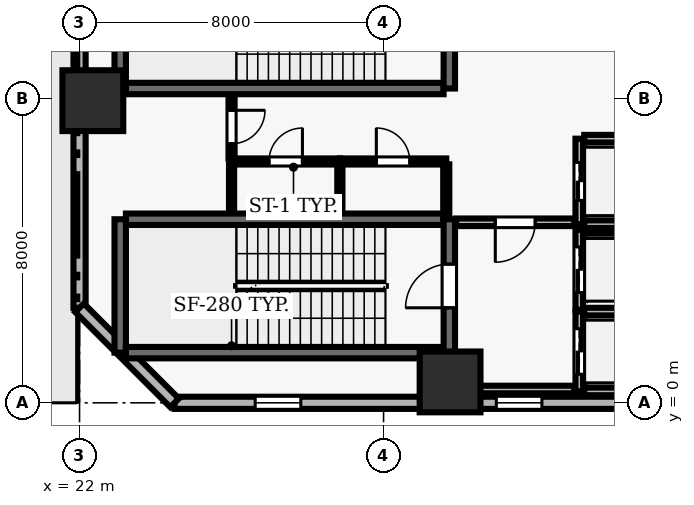
"""IFC4 building model, lengths in metres.
Left out: names, types, materials, properties, quantities, classifications, styles, units other than length and angle.
Written with IfcOpenShell. Run it as: python <this file> out.ifc"""

import sys

from ifc_helpers import new_model, si_unit, direction, frame, frame_2d, origin, origin_2d, place, context, subcontext, project, spatial, rectangle, extrude, element, fill, save


model = new_model("IFC4")
c1 = context("Model", 3, precision=1e-05, world=origin(), true_north=direction((0.0, 1.0)))
c2 = subcontext(c1, "Body", "Model", "MODEL_VIEW")
j1 = project(units=[si_unit("LENGTHUNIT", "METRE"), si_unit("PLANEANGLEUNIT", "RADIAN")], contexts=[c1])
p1 = place(None, origin())
s1 = spatial("IfcSite", under=j1, at=p1, CompositionType="ELEMENT")
p2 = place(p1, origin())
s2 = spatial("IfcBuilding", under=s1, at=p2, CompositionType="ELEMENT")
p3 = place(p2, origin())
s3 = spatial("IfcBuildingStorey", under=s2, at=p3, CompositionType="ELEMENT", Elevation=0.0)
for number, where, z_axis, x_axis in (
    (1, (31.75, 0.55, 0.0), (0.0, 0.0, 1.0), (1.0, 0.0, 0.0)),
    (2, (22.35, 7.95, 0.0), (0.0, 0.0, 1.0), (1.0, 0.0, 0.0)),
):
    element("IfcColumn", number, at=place(p3, frame(where, z_axis=z_axis, x_axis=x_axis)), inside=s3, PredefinedType="COLUMN", context=c2, shape_type="SweptSolid", body=[
        extrude(rectangle(XDim=1.6, YDim=1.6, at=origin_2d()), origin(), (0.0, 0.0, 1.0), 5.2),
    ])
p4 = place(p3, frame((24.5, 0.0, 0.0), z_axis=(0.0, 0.0, 1.0), x_axis=(1.0, 0.0, 0.0)))
e3 = element("IfcWall", 3, at=p4, inside=s3, PredefinedType="SOLIDWALL", context=c2, shape_type="SweptSolid", body=[
    extrude(rectangle(XDim=49.0, YDim=0.32, at=frame_2d((24.5, 0.0))), origin(), (0.0, 0.0, 1.0), 4.92),
])
p5 = place(p4, frame((2.122, 0.0, 0.9)))
e4 = element("IfcOpeningElement", 4, at=p5, cuts=e3, PredefinedType="OPENING", context=c2, shape_type="SweptSolid", body=[
    extrude(rectangle(XDim=1.2, YDim=1.6, at=frame_2d((0.6, 0.8))), frame((0.0, 0.17, 0.0), z_axis=(0.0, -1.0, 0.0), x_axis=(1.0, 0.0, 0.0)), (0.0, 0.0, 1.0), 0.34),
])
p6 = place(p4, frame((8.467, 0.0, 0.9)))
e5 = element("IfcOpeningElement", 5, at=p6, cuts=e3, PredefinedType="OPENING", context=c2, shape_type="SweptSolid", body=[
    extrude(rectangle(XDim=1.2, YDim=1.6, at=frame_2d((0.6, 0.8))), frame((0.0, 0.17, 0.0), z_axis=(0.0, -1.0, 0.0), x_axis=(1.0, 0.0, 0.0)), (0.0, 0.0, 1.0), 0.34),
])
p7 = place(p4, frame((18.456, 0.0, 0.9)))
e6 = element("IfcOpeningElement", 6, at=p7, cuts=e3, PredefinedType="OPENING", context=c2, shape_type="SweptSolid", body=[
    extrude(rectangle(XDim=1.2, YDim=1.6, at=frame_2d((0.6, 0.8))), frame((0.0, 0.17, 0.0), z_axis=(0.0, -1.0, 0.0), x_axis=(1.0, 0.0, 0.0)), (0.0, 0.0, 1.0), 0.34),
])
p8 = place(p4, frame((23.9, 0.0, 0.9)))
e7 = element("IfcOpeningElement", 7, at=p8, cuts=e3, PredefinedType="OPENING", context=c2, shape_type="SweptSolid", body=[
    extrude(rectangle(XDim=1.2, YDim=1.6, at=frame_2d((0.6, 0.8))), frame((0.0, 0.17, 0.0), z_axis=(0.0, -1.0, 0.0), x_axis=(1.0, 0.0, 0.0)), (0.0, 0.0, 1.0), 0.34),
])
p9 = place(p4, frame((29.344, 0.0, 0.9)))
e8 = element("IfcOpeningElement", 8, at=p9, cuts=e3, PredefinedType="OPENING", context=c2, shape_type="SweptSolid", body=[
    extrude(rectangle(XDim=1.2, YDim=1.6, at=frame_2d((0.6, 0.8))), frame((0.0, 0.17, 0.0), z_axis=(0.0, -1.0, 0.0), x_axis=(1.0, 0.0, 0.0)), (0.0, 0.0, 1.0), 0.34),
])
p10 = place(p4, frame((34.789, 0.0, 0.9)))
e9 = element("IfcOpeningElement", 9, at=p10, cuts=e3, PredefinedType="OPENING", context=c2, shape_type="SweptSolid", body=[
    extrude(rectangle(XDim=1.2, YDim=1.6, at=frame_2d((0.6, 0.8))), frame((0.0, 0.17, 0.0), z_axis=(0.0, -1.0, 0.0), x_axis=(1.0, 0.0, 0.0)), (0.0, 0.0, 1.0), 0.34),
])
p11 = place(p4, frame((40.233, 0.0, 0.9)))
e10 = element("IfcOpeningElement", 10, at=p11, cuts=e3, PredefinedType="OPENING", context=c2, shape_type="SweptSolid", body=[
    extrude(rectangle(XDim=1.2, YDim=1.6, at=frame_2d((0.6, 0.8))), frame((0.0, 0.17, 0.0), z_axis=(0.0, -1.0, 0.0), x_axis=(1.0, 0.0, 0.0)), (0.0, 0.0, 1.0), 0.34),
])
p12 = place(p4, frame((45.678, 0.0, 0.9)))
e11 = element("IfcOpeningElement", 11, at=p12, cuts=e3, PredefinedType="OPENING", context=c2, shape_type="SweptSolid", body=[
    extrude(rectangle(XDim=1.2, YDim=1.6, at=frame_2d((0.6, 0.8))), frame((0.0, 0.17, 0.0), z_axis=(0.0, -1.0, 0.0), x_axis=(1.0, 0.0, 0.0)), (0.0, 0.0, 1.0), 0.34),
])
p13 = place(p3, frame((22.0, 51.5, 0.0), z_axis=(0.0, 0.0, 1.0), x_axis=(0.0, -1.0, 0.0)))
e12 = element("IfcWall", 12, at=p13, inside=s3, PredefinedType="SOLIDWALL", context=c2, shape_type="SweptSolid", body=[
    extrude(rectangle(XDim=49.0, YDim=0.32, at=frame_2d((24.5, 0.0))), origin(), (0.0, 0.0, 1.0), 4.92),
])
p14 = place(p13, frame((11.4, 0.0, 0.0)))
e13 = element("IfcOpeningElement", 13, at=p14, cuts=e12, PredefinedType="OPENING", context=c2, shape_type="SweptSolid", body=[
    extrude(rectangle(XDim=1.8, YDim=2.4, at=frame_2d((0.9, 1.2))), frame((0.0, 0.17, 0.0), z_axis=(0.0, -1.0, 0.0), x_axis=(1.0, 0.0, 0.0)), (0.0, 0.0, 1.0), 0.34),
])
p15 = place(p13, frame((18.4, 0.0, 0.0)))
e14 = element("IfcOpeningElement", 14, at=p15, cuts=e12, PredefinedType="OPENING", context=c2, shape_type="SweptSolid", body=[
    extrude(rectangle(XDim=1.8, YDim=2.4, at=frame_2d((0.9, 1.2))), frame((0.0, 0.17, 0.0), z_axis=(0.0, -1.0, 0.0), x_axis=(1.0, 0.0, 0.0)), (0.0, 0.0, 1.0), 0.34),
])
p16 = place(p13, frame((1.822, 0.0, 0.9)))
e15 = element("IfcOpeningElement", 15, at=p16, cuts=e12, PredefinedType="OPENING", context=c2, shape_type="SweptSolid", body=[
    extrude(rectangle(XDim=1.8, YDim=2.2, at=frame_2d((0.9, 1.1))), frame((0.0, 0.17, 0.0), z_axis=(0.0, -1.0, 0.0), x_axis=(1.0, 0.0, 0.0)), (0.0, 0.0, 1.0), 0.34),
])
p17 = place(p13, frame((7.267, 0.0, 0.9)))
e16 = element("IfcOpeningElement", 16, at=p17, cuts=e12, PredefinedType="OPENING", context=c2, shape_type="SweptSolid", body=[
    extrude(rectangle(XDim=1.8, YDim=2.2, at=frame_2d((0.9, 1.1))), frame((0.0, 0.17, 0.0), z_axis=(0.0, -1.0, 0.0), x_axis=(1.0, 0.0, 0.0)), (0.0, 0.0, 1.0), 0.34),
])
p18 = place(p13, frame((23.15, 0.0, 0.9)))
e17 = element("IfcOpeningElement", 17, at=p18, cuts=e12, PredefinedType="OPENING", context=c2, shape_type="SweptSolid", body=[
    extrude(rectangle(XDim=1.8, YDim=2.2, at=frame_2d((0.9, 1.1))), frame((0.0, 0.17, 0.0), z_axis=(0.0, -1.0, 0.0), x_axis=(1.0, 0.0, 0.0)), (0.0, 0.0, 1.0), 0.34),
])
p19 = place(p13, frame((29.494, 0.0, 0.9)))
e18 = element("IfcOpeningElement", 18, at=p19, cuts=e12, PredefinedType="OPENING", context=c2, shape_type="SweptSolid", body=[
    extrude(rectangle(XDim=1.8, YDim=2.2, at=frame_2d((0.9, 1.1))), frame((0.0, 0.17, 0.0), z_axis=(0.0, -1.0, 0.0), x_axis=(1.0, 0.0, 0.0)), (0.0, 0.0, 1.0), 0.34),
])
p20 = place(p13, frame((34.039, 0.0, 0.9)))
e19 = element("IfcOpeningElement", 19, at=p20, cuts=e12, PredefinedType="OPENING", context=c2, shape_type="SweptSolid", body=[
    extrude(rectangle(XDim=1.8, YDim=2.2, at=frame_2d((0.9, 1.1))), frame((0.0, 0.17, 0.0), z_axis=(0.0, -1.0, 0.0), x_axis=(1.0, 0.0, 0.0)), (0.0, 0.0, 1.0), 0.34),
])
p21 = place(p13, frame((39.933, 0.0, 0.9)))
e20 = element("IfcOpeningElement", 20, at=p21, cuts=e12, PredefinedType="OPENING", context=c2, shape_type="SweptSolid", body=[
    extrude(rectangle(XDim=1.8, YDim=2.2, at=frame_2d((0.9, 1.1))), frame((0.0, 0.17, 0.0), z_axis=(0.0, -1.0, 0.0), x_axis=(1.0, 0.0, 0.0)), (0.0, 0.0, 1.0), 0.34),
])
p22 = place(p3, frame((22.0, 2.5, 0.0), z_axis=(0.0, 0.0, 1.0), x_axis=(0.707106781187, -0.707106781187, 0.0)))
e21 = element("IfcWall", 21, at=p22, inside=s3, PredefinedType="SOLIDWALL", context=c2, shape_type="SweptSolid", body=[
    extrude(rectangle(XDim=3.536, YDim=0.32, at=frame_2d((1.768, 0.0))), origin(), (0.0, 0.0, 1.0), 4.92),
])
p23 = place(p3, frame((31.58, 4.83, 0.0), z_axis=(0.0, 0.0, 1.0), x_axis=(-1.0, 0.0, 0.0)))
e22 = element("IfcWall", 22, at=p23, inside=s3, PredefinedType="SHEAR", context=c2, shape_type="SweptSolid", body=[
    extrude(rectangle(XDim=8.36, YDim=0.3, at=frame_2d((4.18, 0.0))), origin(), (0.0, 0.0, 1.0), 4.92),
])
p24 = place(p3, frame((23.07, 4.83, 0.0), z_axis=(0.0, 0.0, 1.0), x_axis=(0.0, -1.0, 0.0)))
e23 = element("IfcWall", 23, at=p24, inside=s3, PredefinedType="SHEAR", context=c2, shape_type="SweptSolid", body=[
    extrude(rectangle(XDim=3.51, YDim=0.3, at=frame_2d((1.755, 0.0))), origin(), (0.0, 0.0, 1.0), 4.92),
])
p25 = place(p3, frame((23.22, 1.32, 0.0), z_axis=(0.0, 0.0, 1.0), x_axis=(1.0, 0.0, 0.0)))
e24 = element("IfcWall", 24, at=p25, inside=s3, PredefinedType="SHEAR", context=c2, shape_type="SweptSolid", body=[
    extrude(rectangle(XDim=8.36, YDim=0.3, at=frame_2d((4.18, 0.0))), origin(), (0.0, 0.0, 1.0), 4.92),
])
p26 = place(p3, frame((31.73, 0.96, 0.0), z_axis=(0.0, 0.0, 1.0), x_axis=(0.0, 1.0, 0.0)))
e25 = element("IfcWall", 25, at=p26, inside=s3, PredefinedType="SHEAR", context=c2, shape_type="SweptSolid", body=[
    extrude(rectangle(XDim=3.87, YDim=0.3, at=frame_2d((1.935, 0.0))), origin(), (0.0, 0.0, 1.0), 4.92),
])
p27 = place(p26, frame((1.54, 0.0, 0.0)))
e26 = element("IfcOpeningElement", 26, at=p27, cuts=e25, PredefinedType="OPENING", context=c2, shape_type="SweptSolid", body=[
    extrude(rectangle(XDim=1.15, YDim=2.15, at=frame_2d((0.575, 1.075))), frame((0.0, 0.16, 0.0), z_axis=(0.0, -1.0, 0.0), x_axis=(1.0, 0.0, 0.0)), (0.0, 0.0, 1.0), 0.32),
])
p28 = place(p3, frame((23.07, 11.78, 0.0), z_axis=(0.0, 0.0, 1.0), x_axis=(0.0, -1.0, 0.0)))
e27 = element("IfcWall", 27, at=p28, inside=s3, PredefinedType="SHEAR", context=c2, shape_type="SweptSolid", body=[
    extrude(rectangle(XDim=3.51, YDim=0.3, at=frame_2d((1.755, 0.0))), origin(), (0.0, 0.0, 1.0), 4.92),
])
p29 = place(p3, frame((23.22, 8.27, 0.0), z_axis=(0.0, 0.0, 1.0), x_axis=(1.0, 0.0, 0.0)))
e28 = element("IfcWall", 28, at=p29, inside=s3, PredefinedType="SHEAR", context=c2, shape_type="SweptSolid", body=[
    extrude(rectangle(XDim=8.36, YDim=0.3, at=frame_2d((4.18, 0.0))), origin(), (0.0, 0.0, 1.0), 4.92),
])
p30 = place(p3, frame((31.73, 8.27, 0.0), z_axis=(0.0, 0.0, 1.0), x_axis=(0.0, 1.0, 0.0)))
e29 = element("IfcWall", 29, at=p30, inside=s3, PredefinedType="SHEAR", context=c2, shape_type="SweptSolid", body=[
    extrude(rectangle(XDim=3.51, YDim=0.3, at=frame_2d((1.755, 0.0))), origin(), (0.0, 0.0, 1.0), 4.92),
])
p31 = place(p30, frame((1.18, 0.0, 0.0)))
e30 = element("IfcOpeningElement", 30, at=p31, cuts=e29, PredefinedType="OPENING", context=c2, shape_type="SweptSolid", body=[
    extrude(rectangle(XDim=1.15, YDim=2.15, at=frame_2d((0.575, 1.075))), frame((0.0, 0.16, 0.0), z_axis=(0.0, -1.0, 0.0), x_axis=(1.0, 0.0, 0.0)), (0.0, 0.0, 1.0), 0.32),
])
p32 = place(p3, frame((35.15, 2.4, 0.0), z_axis=(0.0, 0.0, 1.0), x_axis=(0.0, -1.0, 0.0)))
e31 = element("IfcWall", 31, at=p32, inside=s3, PredefinedType="SOLIDWALL", context=c2, shape_type="SweptSolid", body=[
    extrude(rectangle(XDim=2.1, YDim=0.2, at=frame_2d((1.05, 0.0))), origin(), (0.0, 0.0, 1.0), 4.92),
])
p33 = place(p32, frame((0.45, 0.0, 0.0)))
e32 = element("IfcOpeningElement", 32, at=p33, cuts=e31, PredefinedType="OPENING", context=c2, shape_type="SweptSolid", body=[
    extrude(rectangle(XDim=1.2, YDim=2.15, at=frame_2d((0.6, 1.075))), frame((0.0, 0.11, 0.0), z_axis=(0.0, -1.0, 0.0), x_axis=(1.0, 0.0, 0.0)), (0.0, 0.0, 1.0), 0.22),
])
for number, where, z_axis, x_axis in (
    (33, (35.28, 0.3, 0.0), (0.0, 0.0, 1.0), (1.0, 0.0, 0.0)),
    (34, (37.42, 2.4, 0.0), (0.0, 0.0, 1.0), (-1.0, 0.0, 0.0)),
):
    element("IfcWall", number, at=place(p3, frame(where, z_axis=z_axis, x_axis=x_axis)), inside=s3, PredefinedType="SOLIDWALL", context=c2, shape_type="SweptSolid", body=[
        extrude(rectangle(XDim=2.14, YDim=0.2, at=frame_2d((1.07, 0.0))), origin(), (0.0, 0.0, 1.0), 4.92),
    ])
p34 = place(p3, frame((35.15, 4.55, 0.0), z_axis=(0.0, 0.0, 1.0), x_axis=(0.0, -1.0, 0.0)))
e35 = element("IfcWall", 35, at=p34, inside=s3, PredefinedType="SOLIDWALL", context=c2, shape_type="SweptSolid", body=[
    extrude(rectangle(XDim=2.1, YDim=0.2, at=frame_2d((1.05, 0.0))), origin(), (0.0, 0.0, 1.0), 4.92),
])
p35 = place(p34, frame((0.45, 0.0, 0.0)))
e36 = element("IfcOpeningElement", 36, at=p35, cuts=e35, PredefinedType="OPENING", context=c2, shape_type="SweptSolid", body=[
    extrude(rectangle(XDim=1.2, YDim=2.15, at=frame_2d((0.6, 1.075))), frame((0.0, 0.11, 0.0), z_axis=(0.0, -1.0, 0.0), x_axis=(1.0, 0.0, 0.0)), (0.0, 0.0, 1.0), 0.22),
])
p36 = place(p3, frame((37.42, 4.55, 0.0), z_axis=(0.0, 0.0, 1.0), x_axis=(-1.0, 0.0, 0.0)))
e37 = element("IfcWall", 37, at=p36, inside=s3, PredefinedType="SOLIDWALL", context=c2, shape_type="SweptSolid", body=[
    extrude(rectangle(XDim=2.14, YDim=0.2, at=frame_2d((1.07, 0.0))), origin(), (0.0, 0.0, 1.0), 4.92),
])
p37 = place(p3, frame((35.15, 6.95, 0.0), z_axis=(0.0, 0.0, 1.0), x_axis=(0.0, -1.0, 0.0)))
e38 = element("IfcWall", 38, at=p37, inside=s3, PredefinedType="SOLIDWALL", context=c2, shape_type="SweptSolid", body=[
    extrude(rectangle(XDim=2.25, YDim=0.2, at=frame_2d((1.125, 0.0))), origin(), (0.0, 0.0, 1.0), 4.92),
])
p38 = place(p37, frame((0.625, 0.0, 0.0)))
e39 = element("IfcOpeningElement", 39, at=p38, cuts=e38, PredefinedType="OPENING", context=c2, shape_type="SweptSolid", body=[
    extrude(rectangle(XDim=1.0, YDim=2.1, at=frame_2d((0.5, 1.05))), frame((0.0, 0.11, 0.0), z_axis=(0.0, -1.0, 0.0), x_axis=(1.0, 0.0, 0.0)), (0.0, 0.0, 1.0), 0.22),
])
for number, where, z_axis, x_axis in (
    (40, (35.28, 4.7, 0.0), (0.0, 0.0, 1.0), (1.0, 0.0, 0.0)),
    (41, (37.42, 6.95, 0.0), (0.0, 0.0, 1.0), (-1.0, 0.0, 0.0)),
):
    element("IfcWall", number, at=place(p3, frame(where, z_axis=z_axis, x_axis=x_axis)), inside=s3, PredefinedType="SOLIDWALL", context=c2, shape_type="SweptSolid", body=[
        extrude(rectangle(XDim=2.14, YDim=0.2, at=frame_2d((1.07, 0.0))), origin(), (0.0, 0.0, 1.0), 4.92),
    ])
p39 = place(p3, frame((26.0, 6.35, 0.0), z_axis=(0.0, 0.0, 1.0), x_axis=(1.0, 0.0, 0.0)))
e42 = element("IfcWall", 42, at=p39, inside=s3, PredefinedType="PARTITIONING", context=c2, shape_type="SweptSolid", body=[
    extrude(rectangle(XDim=2.85, YDim=0.16, at=frame_2d((1.425, 0.0))), origin(), (0.0, 0.0, 1.0), 4.92),
])
p40 = place(p39, frame((0.985, 0.0, 0.0)))
e43 = element("IfcOpeningElement", 43, at=p40, cuts=e42, PredefinedType="OPENING", context=c2, shape_type="SweptSolid", body=[
    extrude(rectangle(XDim=0.88, YDim=2.1, at=frame_2d((0.44, 1.05))), frame((0.0, 0.09, 0.0), z_axis=(0.0, -1.0, 0.0), x_axis=(1.0, 0.0, 0.0)), (0.0, 0.0, 1.0), 0.18),
])
p41 = place(p3, frame((28.85, 6.35, 0.0), z_axis=(0.0, 0.0, 1.0), x_axis=(1.0, 0.0, 0.0)))
e44 = element("IfcWall", 44, at=p41, inside=s3, PredefinedType="PARTITIONING", context=c2, shape_type="SweptSolid", body=[
    extrude(rectangle(XDim=2.8, YDim=0.16, at=frame_2d((1.4, 0.0))), origin(), (0.0, 0.0, 1.0), 4.92),
])
p42 = place(p41, frame((0.96, 0.0, 0.0)))
e45 = element("IfcOpeningElement", 45, at=p42, cuts=e44, PredefinedType="OPENING", context=c2, shape_type="SweptSolid", body=[
    extrude(rectangle(XDim=0.88, YDim=2.1, at=frame_2d((0.44, 1.05))), frame((0.0, 0.09, 0.0), z_axis=(0.0, -1.0, 0.0), x_axis=(1.0, 0.0, 0.0)), (0.0, 0.0, 1.0), 0.18),
])
p43 = place(p3, frame((31.65, 0.35, 0.0), z_axis=(0.0, 0.0, 1.0), x_axis=(1.0, 0.0, 0.0)))
e46 = element("IfcWall", 46, at=p43, inside=s3, PredefinedType="SOLIDWALL", context=c2, shape_type="SweptSolid", body=[
    extrude(rectangle(XDim=3.37, YDim=0.2, at=frame_2d((1.685, 0.0))), origin(), (0.0, 0.0, 1.0), 4.92),
])
p44 = place(p3, frame((35.02, 4.75, 0.0), z_axis=(0.0, 0.0, 1.0), x_axis=(-1.0, 0.0, 0.0)))
e47 = element("IfcWall", 47, at=p44, inside=s3, PredefinedType="SOLIDWALL", context=c2, shape_type="SweptSolid", body=[
    extrude(rectangle(XDim=3.11, YDim=0.2, at=frame_2d((1.555, 0.0))), origin(), (0.0, 0.0, 1.0), 4.92),
])
p45 = place(p44, frame((1.03, 0.0, 0.0)))
e48 = element("IfcOpeningElement", 48, at=p45, cuts=e47, PredefinedType="OPENING", context=c2, shape_type="SweptSolid", body=[
    extrude(rectangle(XDim=1.05, YDim=2.15, at=frame_2d((0.525, 1.075))), frame((0.0, 0.11, 0.0), z_axis=(0.0, -1.0, 0.0), x_axis=(1.0, 0.0, 0.0)), (0.0, 0.0, 1.0), 0.22),
])
p46 = place(p3, frame((26.0, 5.01, 0.0), z_axis=(0.0, 0.0, 1.0), x_axis=(0.0, 1.0, 0.0)))
e49 = element("IfcWall", 49, at=p46, inside=s3, PredefinedType="PARTITIONING", context=c2, shape_type="SweptSolid", body=[
    extrude(rectangle(XDim=1.265, YDim=0.135, at=frame_2d((0.632, 0.0))), origin(), (0.0, 0.0, 1.0), 4.92),
])
p47 = place(p3, frame((26.0, 8.09, 0.0), z_axis=(0.0, 0.0, 1.0), x_axis=(0.0, -1.0, 0.0)))
e50 = element("IfcWall", 50, at=p47, inside=s3, PredefinedType="PARTITIONING", context=c2, shape_type="SweptSolid", body=[
    extrude(rectangle(XDim=1.665, YDim=0.16, at=frame_2d((0.833, 0.0))), origin(), (0.0, 0.0, 1.0), 4.92),
])
p48 = place(p47, frame((0.393, 0.0, 0.0)))
e51 = element("IfcOpeningElement", 51, at=p48, cuts=e50, PredefinedType="OPENING", context=c2, shape_type="SweptSolid", body=[
    extrude(rectangle(XDim=0.88, YDim=2.1, at=frame_2d((0.44, 1.05))), frame((0.0, 0.09, 0.0), z_axis=(0.0, -1.0, 0.0), x_axis=(1.0, 0.0, 0.0)), (0.0, 0.0, 1.0), 0.18),
])
p49 = place(p3, frame((28.85, 5.01, 0.0), z_axis=(0.0, 0.0, 1.0), x_axis=(0.0, 1.0, 0.0)))
e52 = element("IfcWall", 52, at=p49, inside=s3, PredefinedType="PARTITIONING", context=c2, shape_type="SweptSolid", body=[
    extrude(rectangle(XDim=1.265, YDim=0.135, at=frame_2d((0.632, 0.0))), origin(), (0.0, 0.0, 1.0), 4.92),
])
p50 = place(p3, frame((31.65, 4.86, 0.0), z_axis=(0.0, 0.0, 1.0), x_axis=(0.0, 1.0, 0.0)))
e53 = element("IfcWall", 53, at=p50, inside=s3, PredefinedType="PARTITIONING", context=c2, shape_type="SweptSolid", body=[
    extrude(rectangle(XDim=1.415, YDim=0.16, at=frame_2d((0.708, 0.0))), origin(), (0.0, 0.0, 1.0), 4.92),
])
p51 = place(p5, origin())
e54 = element("IfcWindow", 54, at=p51, inside=s3, PartitioningType="SINGLE_PANEL", PredefinedType="WINDOW", context=c2, shape_type="SweptSolid", body=[
    extrude(rectangle(XDim=1.2, YDim=1.6, at=frame_2d((0.6, 0.8))), frame((0.0, 0.03, 0.0), z_axis=(0.0, -1.0, 0.0), x_axis=(1.0, 0.0, 0.0)), (0.0, 0.0, 1.0), 0.06),
])
fill(e4, e54)
p52 = place(p6, origin())
e55 = element("IfcWindow", 55, at=p52, inside=s3, PartitioningType="SINGLE_PANEL", PredefinedType="WINDOW", context=c2, shape_type="SweptSolid", body=[
    extrude(rectangle(XDim=1.2, YDim=1.6, at=frame_2d((0.6, 0.8))), frame((0.0, 0.03, 0.0), z_axis=(0.0, -1.0, 0.0), x_axis=(1.0, 0.0, 0.0)), (0.0, 0.0, 1.0), 0.06),
])
fill(e5, e55)
p53 = place(p27, origin())
e56 = element("IfcDoor", 56, at=p53, inside=s3, OperationType="SINGLE_SWING_LEFT", PredefinedType="DOOR", context=c2, shape_type="SweptSolid", body=[
    extrude(rectangle(XDim=1.15, YDim=2.15, at=frame_2d((0.575, 1.075))), frame((0.0, 0.025, 0.0), z_axis=(0.0, -1.0, 0.0), x_axis=(1.0, 0.0, 0.0)), (0.0, 0.0, 1.0), 0.05),
])
fill(e26, e56)
p54 = place(p33, origin())
e57 = element("IfcDoor", 57, at=p54, inside=s3, OperationType="DOUBLE_DOOR_SLIDING", PredefinedType="DOOR", context=c2, shape_type="SweptSolid", body=[
    extrude(rectangle(XDim=1.2, YDim=2.15, at=frame_2d((0.6, 1.075))), frame((0.0, 0.025, 0.0), z_axis=(0.0, -1.0, 0.0), x_axis=(1.0, 0.0, 0.0)), (0.0, 0.0, 1.0), 0.05),
])
fill(e32, e57)
p55 = place(p35, origin())
e58 = element("IfcDoor", 58, at=p55, inside=s3, OperationType="DOUBLE_DOOR_SLIDING", PredefinedType="DOOR", context=c2, shape_type="SweptSolid", body=[
    extrude(rectangle(XDim=1.2, YDim=2.15, at=frame_2d((0.6, 1.075))), frame((0.0, 0.025, 0.0), z_axis=(0.0, -1.0, 0.0), x_axis=(1.0, 0.0, 0.0)), (0.0, 0.0, 1.0), 0.05),
])
fill(e36, e58)
p56 = place(p38, origin())
e59 = element("IfcDoor", 59, at=p56, inside=s3, OperationType="DOUBLE_DOOR_SLIDING", PredefinedType="DOOR", context=c2, shape_type="SweptSolid", body=[
    extrude(rectangle(XDim=1.0, YDim=2.1, at=frame_2d((0.5, 1.05))), frame((0.0, 0.025, 0.0), z_axis=(0.0, -1.0, 0.0), x_axis=(1.0, 0.0, 0.0)), (0.0, 0.0, 1.0), 0.05),
])
fill(e39, e59)
p57 = place(p45, origin())
e60 = element("IfcDoor", 60, at=p57, inside=s3, OperationType="SINGLE_SWING_RIGHT", PredefinedType="DOOR", context=c2, shape_type="SweptSolid", body=[
    extrude(rectangle(XDim=1.05, YDim=2.15, at=frame_2d((0.525, 1.075))), frame((0.0, 0.025, 0.0), z_axis=(0.0, -1.0, 0.0), x_axis=(1.0, 0.0, 0.0)), (0.0, 0.0, 1.0), 0.05),
])
fill(e48, e60)
p58 = place(p48, origin())
e61 = element("IfcDoor", 61, at=p58, inside=s3, OperationType="SINGLE_SWING_LEFT", PredefinedType="DOOR", context=c2, shape_type="SweptSolid", body=[
    extrude(rectangle(XDim=0.88, YDim=2.1, at=frame_2d((0.44, 1.05))), frame((0.0, 0.025, 0.0), z_axis=(0.0, -1.0, 0.0), x_axis=(1.0, 0.0, 0.0)), (0.0, 0.0, 1.0), 0.05),
])
fill(e51, e61)
p59 = place(p40, origin())
e62 = element("IfcDoor", 62, at=p59, inside=s3, OperationType="SINGLE_SWING_RIGHT", PredefinedType="DOOR", context=c2, shape_type="SweptSolid", body=[
    extrude(rectangle(XDim=0.88, YDim=2.1, at=frame_2d((0.44, 1.05))), frame((0.0, 0.025, 0.0), z_axis=(0.0, -1.0, 0.0), x_axis=(1.0, 0.0, 0.0)), (0.0, 0.0, 1.0), 0.05),
])
fill(e43, e62)
p60 = place(p42, origin())
e63 = element("IfcDoor", 63, at=p60, inside=s3, OperationType="SINGLE_SWING_LEFT", PredefinedType="DOOR", context=c2, shape_type="SweptSolid", body=[
    extrude(rectangle(XDim=0.88, YDim=2.1, at=frame_2d((0.44, 1.05))), frame((0.0, 0.025, 0.0), z_axis=(0.0, -1.0, 0.0), x_axis=(1.0, 0.0, 0.0)), (0.0, 0.0, 1.0), 0.05),
])
fill(e45, e63)
save(model, sys.argv[1])
